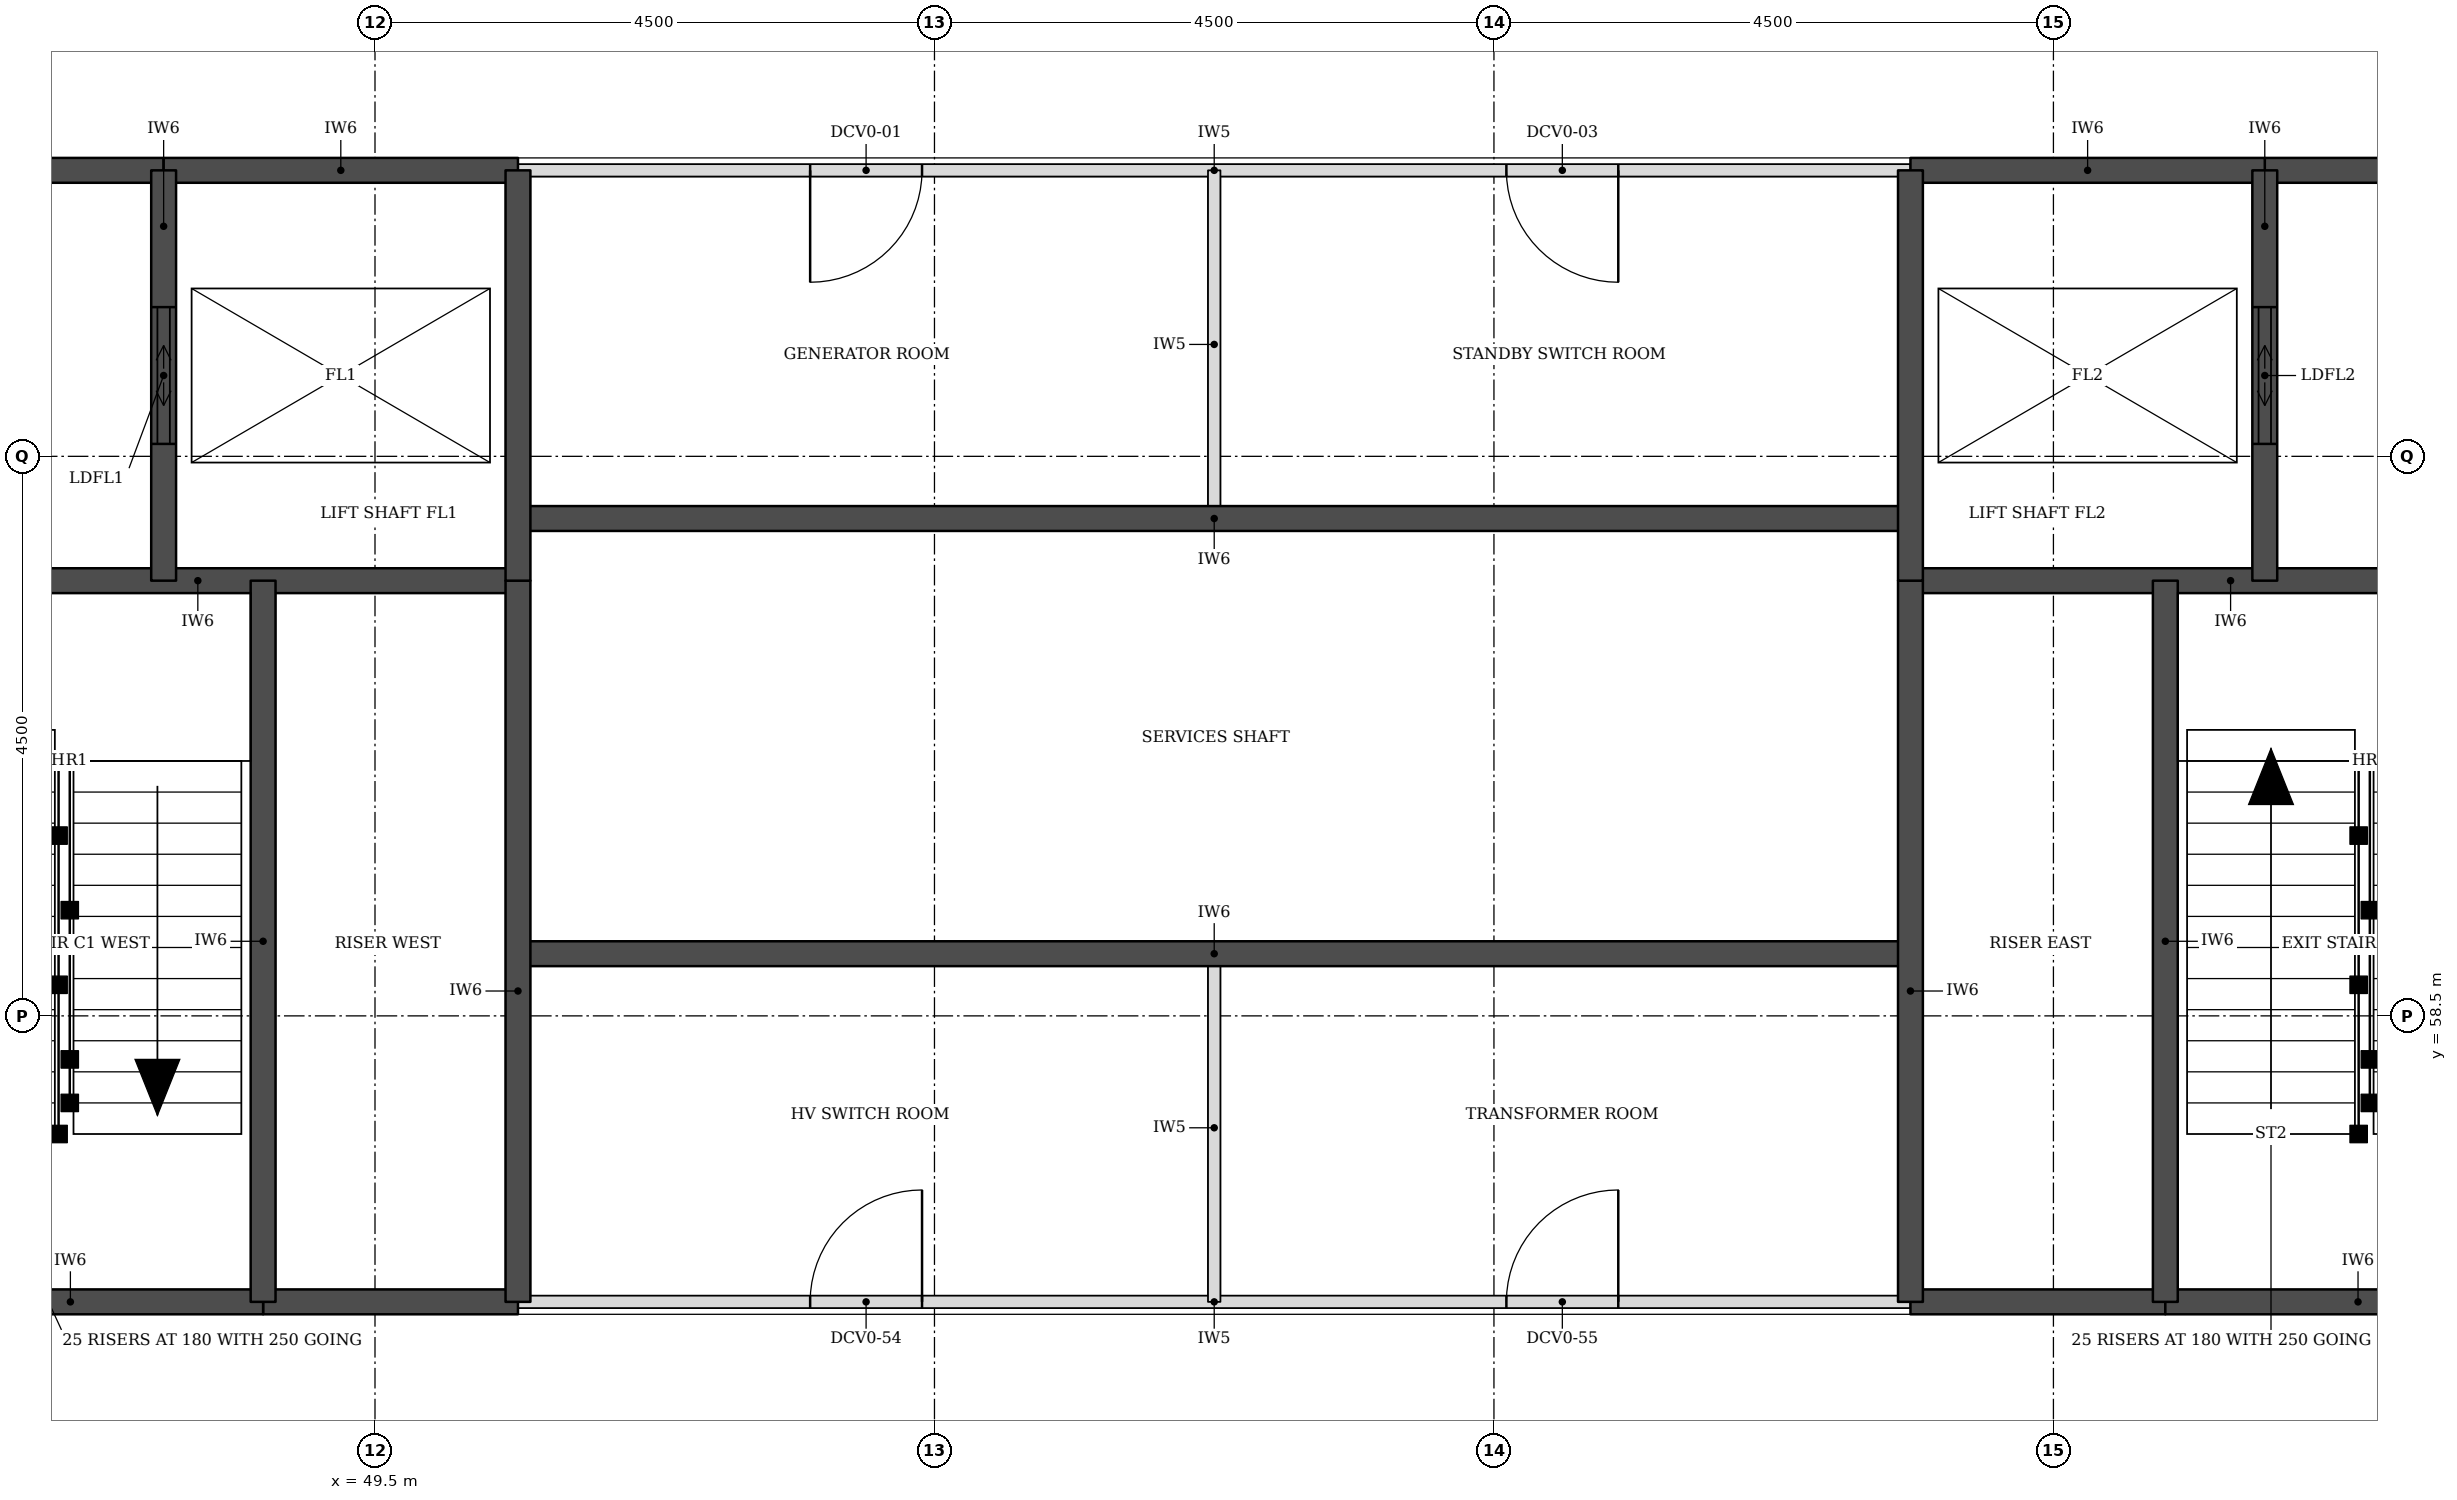
"""IFC4 building model, lengths in metres.
Left out: names, types, materials, properties, quantities, classifications, styles, units other than length and angle.
Written with IfcOpenShell. Run it as: python <this file> out.ifc"""

import sys

from ifc_helpers import new_model, si_unit, direction, frame, frame_2d, origin, place, context, subcontext, project, spatial, rectangle, extrude, element, fill, save


model = new_model("IFC4")
c1 = context("Model", 3, precision=1e-05, world=origin(), true_north=direction((0.0, 1.0)))
c2 = subcontext(c1, "Body", "Model", "MODEL_VIEW")
j1 = project(units=[si_unit("LENGTHUNIT", "METRE"), si_unit("PLANEANGLEUNIT", "RADIAN")], contexts=[c1])
p1 = place(None, origin())
s1 = spatial("IfcSite", under=j1, at=p1, CompositionType="ELEMENT")
p2 = place(p1, origin())
s2 = spatial("IfcBuilding", under=s1, at=p2, CompositionType="ELEMENT")
p3 = place(p2, frame((0.0, 0.0, -9.0)))
s3 = spatial("IfcBuildingStorey", under=s2, at=p3, CompositionType="ELEMENT", Elevation=-9.0)
p4 = place(p3, frame((50.65, 56.2, 0.0), z_axis=(0.0, 0.0, 1.0), x_axis=(1.0, 0.0, 0.0)))
e1 = element("IfcWall", 1, at=p4, inside=s3, PredefinedType="PARTITIONING", context=c2, shape_type="SweptSolid", body=[
    extrude(rectangle(XDim=11.2, YDim=0.1, at=frame_2d((5.6, 0.0))), origin(), (0.0, 0.0, 1.0), 4.1),
])
p5 = place(p4, frame((2.35, 0.0, 0.0)))
e2 = element("IfcOpeningElement", 2, at=p5, cuts=e1, PredefinedType="OPENING", context=c2, shape_type="SweptSolid", body=[
    extrude(rectangle(XDim=0.9, YDim=2.1, at=frame_2d((0.45, 1.05))), frame((0.0, 0.06, 0.0), z_axis=(0.0, -1.0, 0.0), x_axis=(1.0, 0.0, 0.0)), (0.0, 0.0, 1.0), 0.12),
])
p6 = place(p4, frame((7.95, 0.0, 0.0)))
e3 = element("IfcOpeningElement", 3, at=p6, cuts=e1, PredefinedType="OPENING", context=c2, shape_type="SweptSolid", body=[
    extrude(rectangle(XDim=0.9, YDim=2.1, at=frame_2d((0.45, 1.05))), frame((0.0, 0.06, 0.0), z_axis=(0.0, -1.0, 0.0), x_axis=(1.0, 0.0, 0.0)), (0.0, 0.0, 1.0), 0.12),
])
for number, where, z_axis, x_axis in (
    (4, (48.6, 56.2, 0.0), (0.0, 0.0, 1.0), (1.0, 0.0, 0.0)),
    (5, (61.85, 56.2, 0.0), (0.0, 0.0, 1.0), (1.0, 0.0, 0.0)),
):
    element("IfcWall", number, at=place(p3, frame(where, z_axis=z_axis, x_axis=x_axis)), inside=s3, PredefinedType="SOLIDWALL", context=c2, shape_type="SweptSolid", body=[
        extrude(rectangle(XDim=2.05, YDim=0.2, at=frame_2d((1.025, 0.0))), origin(), (0.0, 0.0, 1.0), 4.1),
    ])
for number, where, z_axis, x_axis in (
    (6, (45.5, 56.2, 0.0), (0.0, 0.0, 1.0), (1.0, 0.0, 0.0)),
    (7, (63.9, 56.2, 0.0), (0.0, 0.0, 1.0), (1.0, 0.0, 0.0)),
):
    element("IfcWall", number, at=place(p3, frame(where, z_axis=z_axis, x_axis=x_axis)), inside=s3, PredefinedType="SOLIDWALL", context=c2, shape_type="SweptSolid", body=[
        extrude(rectangle(XDim=3.1, YDim=0.2, at=frame_2d((1.55, 0.0))), origin(), (0.0, 0.0, 1.0), 4.1),
    ])
p7 = place(p3, frame((50.65, 59.0, 0.0), z_axis=(0.0, 0.0, 1.0), x_axis=(1.0, 0.0, 0.0)))
e8 = element("IfcWall", 8, at=p7, inside=s3, PredefinedType="SOLIDWALL", context=c2, shape_type="SweptSolid", body=[
    extrude(rectangle(XDim=11.2, YDim=0.2, at=frame_2d((5.6, 0.0))), origin(), (0.0, 0.0, 1.0), 4.1),
])
for number, where, z_axis, x_axis in (
    (9, (45.5, 62.0, 0.0), (0.0, 0.0, 1.0), (1.0, 0.0, 0.0)),
    (10, (61.85, 62.0, 0.0), (0.0, 0.0, 1.0), (1.0, 0.0, 0.0)),
):
    element("IfcWall", number, at=place(p3, frame(where, z_axis=z_axis, x_axis=x_axis)), inside=s3, PredefinedType="SOLIDWALL", context=c2, shape_type="SweptSolid", body=[
        extrude(rectangle(XDim=5.15, YDim=0.2, at=frame_2d((2.575, 0.0))), origin(), (0.0, 0.0, 1.0), 4.1),
    ])
p8 = place(p3, frame((50.65, 62.5, 0.0), z_axis=(0.0, 0.0, 1.0), x_axis=(1.0, 0.0, 0.0)))
e11 = element("IfcWall", 11, at=p8, inside=s3, PredefinedType="SOLIDWALL", context=c2, shape_type="SweptSolid", body=[
    extrude(rectangle(XDim=11.2, YDim=0.2, at=frame_2d((5.6, 0.0))), origin(), (0.0, 0.0, 1.0), 4.1),
])
p9 = place(p3, frame((50.65, 65.3, 0.0), z_axis=(0.0, 0.0, 1.0), x_axis=(1.0, 0.0, 0.0)))
e12 = element("IfcWall", 12, at=p9, inside=s3, PredefinedType="PARTITIONING", context=c2, shape_type="SweptSolid", body=[
    extrude(rectangle(XDim=11.2, YDim=0.1, at=frame_2d((5.6, 0.0))), origin(), (0.0, 0.0, 1.0), 4.1),
])
p10 = place(p9, frame((2.35, 0.0, 0.0)))
e13 = element("IfcOpeningElement", 13, at=p10, cuts=e12, PredefinedType="OPENING", context=c2, shape_type="SweptSolid", body=[
    extrude(rectangle(XDim=0.9, YDim=2.1, at=frame_2d((0.45, 1.05))), frame((0.0, 0.06, 0.0), z_axis=(0.0, -1.0, 0.0), x_axis=(1.0, 0.0, 0.0)), (0.0, 0.0, 1.0), 0.12),
])
p11 = place(p9, frame((7.95, 0.0, 0.0)))
e14 = element("IfcOpeningElement", 14, at=p11, cuts=e12, PredefinedType="OPENING", context=c2, shape_type="SweptSolid", body=[
    extrude(rectangle(XDim=0.9, YDim=2.1, at=frame_2d((0.45, 1.05))), frame((0.0, 0.06, 0.0), z_axis=(0.0, -1.0, 0.0), x_axis=(1.0, 0.0, 0.0)), (0.0, 0.0, 1.0), 0.12),
])
for number, where, z_axis, x_axis in (
    (15, (45.5, 65.3, 0.0), (0.0, 0.0, 1.0), (1.0, 0.0, 0.0)),
    (16, (64.7, 65.3, 0.0), (0.0, 0.0, 1.0), (1.0, 0.0, 0.0)),
):
    element("IfcWall", number, at=place(p3, frame(where, z_axis=z_axis, x_axis=x_axis)), inside=s3, PredefinedType="SOLIDWALL", context=c2, shape_type="SweptSolid", body=[
        extrude(rectangle(XDim=2.3, YDim=0.2, at=frame_2d((1.15, 0.0))), origin(), (0.0, 0.0, 1.0), 4.1),
    ])
for number, where, z_axis, x_axis in (
    (17, (47.8, 65.3, 0.0), (0.0, 0.0, 1.0), (1.0, 0.0, 0.0)),
    (18, (61.85, 65.3, 0.0), (0.0, 0.0, 1.0), (1.0, 0.0, 0.0)),
):
    element("IfcWall", number, at=place(p3, frame(where, z_axis=z_axis, x_axis=x_axis)), inside=s3, PredefinedType="SOLIDWALL", context=c2, shape_type="SweptSolid", body=[
        extrude(rectangle(XDim=2.85, YDim=0.2, at=frame_2d((1.425, 0.0))), origin(), (0.0, 0.0, 1.0), 4.1),
    ])
p12 = place(p3, frame((47.8, 62.0, 0.0), z_axis=(0.0, 0.0, 1.0), x_axis=(0.0, 1.0, 0.0)))
e19 = element("IfcWall", 19, at=p12, inside=s3, PredefinedType="SOLIDWALL", context=c2, shape_type="SweptSolid", body=[
    extrude(rectangle(XDim=3.3, YDim=0.2, at=frame_2d((1.65, 0.0))), origin(), (0.0, 0.0, 1.0), 4.1),
])
p13 = place(p12, frame((1.1, 0.0, 0.0)))
e20 = element("IfcOpeningElement", 20, at=p13, cuts=e19, PredefinedType="OPENING", context=c2, shape_type="SweptSolid", body=[
    extrude(rectangle(XDim=1.1, YDim=2.1, at=frame_2d((0.55, 1.05))), frame((0.0, 0.11, 0.0), z_axis=(0.0, -1.0, 0.0), x_axis=(1.0, 0.0, 0.0)), (0.0, 0.0, 1.0), 0.22),
])
for number, where, z_axis, x_axis in (
    (21, (48.6, 56.2, 0.0), (0.0, 0.0, 1.0), (0.0, 1.0, 0.0)),
    (22, (50.65, 56.2, 0.0), (0.0, 0.0, 1.0), (0.0, 1.0, 0.0)),
):
    element("IfcWall", number, at=place(p3, frame(where, z_axis=z_axis, x_axis=x_axis)), inside=s3, PredefinedType="SOLIDWALL", context=c2, shape_type="SweptSolid", body=[
        extrude(rectangle(XDim=5.8, YDim=0.2, at=frame_2d((2.9, 0.0))), origin(), (0.0, 0.0, 1.0), 4.1),
    ])
p14 = place(p3, frame((50.65, 62.0, 0.0), z_axis=(0.0, 0.0, 1.0), x_axis=(0.0, 1.0, 0.0)))
e23 = element("IfcWall", 23, at=p14, inside=s3, PredefinedType="SOLIDWALL", context=c2, shape_type="SweptSolid", body=[
    extrude(rectangle(XDim=3.3, YDim=0.2, at=frame_2d((1.65, 0.0))), origin(), (0.0, 0.0, 1.0), 4.1),
])
for number, where, z_axis, x_axis in (
    (24, (56.25, 56.2, 0.0), (0.0, 0.0, 1.0), (0.0, 1.0, 0.0)),
    (25, (56.25, 62.5, 0.0), (0.0, 0.0, 1.0), (0.0, 1.0, 0.0)),
):
    element("IfcWall", number, at=place(p3, frame(where, z_axis=z_axis, x_axis=x_axis)), inside=s3, PredefinedType="PARTITIONING", context=c2, shape_type="SweptSolid", body=[
        extrude(rectangle(XDim=2.8, YDim=0.1, at=frame_2d((1.4, 0.0))), origin(), (0.0, 0.0, 1.0), 4.1),
    ])
p15 = place(p3, frame((61.85, 56.2, 0.0), z_axis=(0.0, 0.0, 1.0), x_axis=(0.0, 1.0, 0.0)))
e26 = element("IfcWall", 26, at=p15, inside=s3, PredefinedType="SOLIDWALL", context=c2, shape_type="SweptSolid", body=[
    extrude(rectangle(XDim=5.8, YDim=0.2, at=frame_2d((2.9, 0.0))), origin(), (0.0, 0.0, 1.0), 4.1),
])
p16 = place(p3, frame((61.85, 62.0, 0.0), z_axis=(0.0, 0.0, 1.0), x_axis=(0.0, 1.0, 0.0)))
e27 = element("IfcWall", 27, at=p16, inside=s3, PredefinedType="SOLIDWALL", context=c2, shape_type="SweptSolid", body=[
    extrude(rectangle(XDim=3.3, YDim=0.2, at=frame_2d((1.65, 0.0))), origin(), (0.0, 0.0, 1.0), 4.1),
])
p17 = place(p3, frame((63.9, 56.2, 0.0), z_axis=(0.0, 0.0, 1.0), x_axis=(0.0, 1.0, 0.0)))
e28 = element("IfcWall", 28, at=p17, inside=s3, PredefinedType="SOLIDWALL", context=c2, shape_type="SweptSolid", body=[
    extrude(rectangle(XDim=5.8, YDim=0.2, at=frame_2d((2.9, 0.0))), origin(), (0.0, 0.0, 1.0), 4.1),
])
p18 = place(p3, frame((64.7, 62.0, 0.0), z_axis=(0.0, 0.0, 1.0), x_axis=(0.0, 1.0, 0.0)))
e29 = element("IfcWall", 29, at=p18, inside=s3, PredefinedType="SOLIDWALL", context=c2, shape_type="SweptSolid", body=[
    extrude(rectangle(XDim=3.3, YDim=0.2, at=frame_2d((1.65, 0.0))), origin(), (0.0, 0.0, 1.0), 4.1),
])
p19 = place(p18, frame((1.1, 0.0, 0.0)))
e30 = element("IfcOpeningElement", 30, at=p19, cuts=e29, PredefinedType="OPENING", context=c2, shape_type="SweptSolid", body=[
    extrude(rectangle(XDim=1.1, YDim=2.1, at=frame_2d((0.55, 1.05))), frame((0.0, 0.11, 0.0), z_axis=(0.0, -1.0, 0.0), x_axis=(1.0, 0.0, 0.0)), (0.0, 0.0, 1.0), 0.22),
])
p20 = place(p13, origin())
e31 = element("IfcDoor", 31, at=p20, inside=s3, OperationType="DOUBLE_DOOR_SLIDING", PredefinedType="DOOR", context=c2, shape_type="SweptSolid", body=[
    extrude(rectangle(XDim=1.1, YDim=2.1, at=frame_2d((0.55, 1.05))), frame((0.0, 0.025, 0.0), z_axis=(0.0, -1.0, 0.0), x_axis=(1.0, 0.0, 0.0)), (0.0, 0.0, 1.0), 0.05),
])
fill(e20, e31)
p21 = place(p19, origin())
e32 = element("IfcDoor", 32, at=p21, inside=s3, OperationType="DOUBLE_DOOR_SLIDING", PredefinedType="DOOR", context=c2, shape_type="SweptSolid", body=[
    extrude(rectangle(XDim=1.1, YDim=2.1, at=frame_2d((0.55, 1.05))), frame((0.0, 0.025, 0.0), z_axis=(0.0, -1.0, 0.0), x_axis=(1.0, 0.0, 0.0)), (0.0, 0.0, 1.0), 0.05),
])
fill(e30, e32)
p22 = place(p5, origin())
e33 = element("IfcDoor", 33, at=p22, inside=s3, OperationType="SINGLE_SWING_RIGHT", PredefinedType="DOOR", context=c2, shape_type="SweptSolid", body=[
    extrude(rectangle(XDim=0.9, YDim=2.1, at=frame_2d((0.45, 1.05))), frame((0.0, 0.025, 0.0), z_axis=(0.0, -1.0, 0.0), x_axis=(1.0, 0.0, 0.0)), (0.0, 0.0, 1.0), 0.05),
])
fill(e2, e33)
p23 = place(p6, origin())
e34 = element("IfcDoor", 34, at=p23, inside=s3, OperationType="SINGLE_SWING_RIGHT", PredefinedType="DOOR", context=c2, shape_type="SweptSolid", body=[
    extrude(rectangle(XDim=0.9, YDim=2.1, at=frame_2d((0.45, 1.05))), frame((0.0, 0.025, 0.0), z_axis=(0.0, -1.0, 0.0), x_axis=(1.0, 0.0, 0.0)), (0.0, 0.0, 1.0), 0.05),
])
fill(e3, e34)
p24 = place(p10, frame((0.9, 0.0, 0.0), z_axis=(0.0, 0.0, 1.0), x_axis=(-1.0, 0.0, 0.0)))
e35 = element("IfcDoor", 35, at=p24, inside=s3, OperationType="SINGLE_SWING_RIGHT", PredefinedType="DOOR", context=c2, shape_type="SweptSolid", body=[
    extrude(rectangle(XDim=0.9, YDim=2.1, at=frame_2d((0.45, 1.05))), frame((0.0, 0.025, 0.0), z_axis=(0.0, -1.0, 0.0), x_axis=(1.0, 0.0, 0.0)), (0.0, 0.0, 1.0), 0.05),
])
fill(e13, e35)
p25 = place(p11, frame((0.9, 0.0, 0.0), z_axis=(0.0, 0.0, 1.0), x_axis=(-1.0, 0.0, 0.0)))
e36 = element("IfcDoor", 36, at=p25, inside=s3, OperationType="SINGLE_SWING_LEFT", PredefinedType="DOOR", context=c2, shape_type="SweptSolid", body=[
    extrude(rectangle(XDim=0.9, YDim=2.1, at=frame_2d((0.45, 1.05))), frame((0.0, 0.025, 0.0), z_axis=(0.0, -1.0, 0.0), x_axis=(1.0, 0.0, 0.0)), (0.0, 0.0, 1.0), 0.05),
])
fill(e14, e36)
save(model, sys.argv[1])
